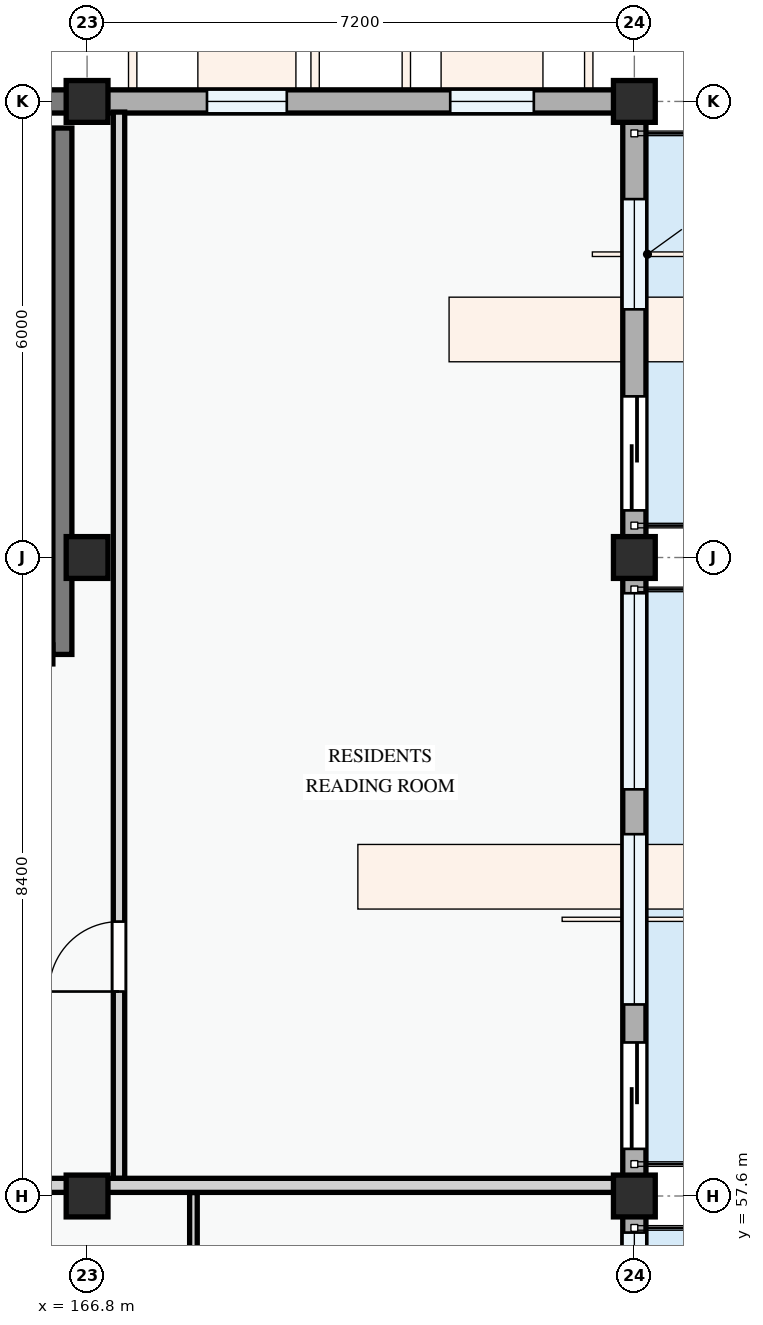
"""IFC4 building model, lengths in metres.
Left out: names, types, materials, properties, quantities, classifications, styles, units other than length and angle.
Written with IfcOpenShell. Run it as: python <this file> out.ifc"""

import sys

from ifc_helpers import new_model, si_unit, direction, frame, frame_2d, origin, origin_2d, place, context, subcontext, project, spatial, rectangle, extrude, element, fill, save


model = new_model("IFC4")
c1 = context("Model", 3, precision=1e-05, world=origin(), true_north=direction((0.0, 1.0)))
c2 = subcontext(c1, "Body", "Model", "MODEL_VIEW")
j1 = project(units=[si_unit("LENGTHUNIT", "METRE"), si_unit("PLANEANGLEUNIT", "RADIAN")], contexts=[c1])
p1 = place(None, origin())
s1 = spatial("IfcSite", under=j1, at=p1, CompositionType="ELEMENT")
p2 = place(p1, origin())
s2 = spatial("IfcBuilding", under=s1, at=p2, CompositionType="ELEMENT")
p3 = place(p2, frame((0.0, 0.0, 14.7)))
s3 = spatial("IfcBuildingStorey", under=s2, at=p3, CompositionType="ELEMENT", Elevation=14.7)
for number, where, z_axis, x_axis in (
    (1, (166.8, 57.6, 0.0), (0.0, 0.0, 1.0), (1.0, 0.0, 0.0)),
    (2, (166.8, 66.0, 0.0), (0.0, 0.0, 1.0), (1.0, 0.0, 0.0)),
    (3, (166.8, 72.0, 0.0), (0.0, 0.0, 1.0), (1.0, 0.0, 0.0)),
    (4, (174.0, 57.6, 0.0), (0.0, 0.0, 1.0), (1.0, 0.0, 0.0)),
    (5, (174.0, 66.0, 0.0), (0.0, 0.0, 1.0), (1.0, 0.0, 0.0)),
    (6, (174.0, 72.0, 0.0), (0.0, 0.0, 1.0), (1.0, 0.0, 0.0)),
):
    element("IfcColumn", number, at=place(p3, frame(where, z_axis=z_axis, x_axis=x_axis)), inside=s3, PredefinedType="COLUMN", context=c2, shape_type="SweptSolid", body=[
        extrude(rectangle(XDim=0.55, YDim=0.55, at=origin_2d()), origin(), (0.0, 0.0, 1.0), 3.3),
    ])
p4 = place(p3, frame((174.0, 51.6, 0.0), z_axis=(0.0, 0.0, 1.0), x_axis=(0.0, 1.0, 0.0)))
e7 = element("IfcWall", 7, at=p4, inside=s3, PredefinedType="STANDARD", context=c2, shape_type="SweptSolid", body=[
    extrude(rectangle(XDim=6.0, YDim=0.305, at=frame_2d((3.0, 0.0))), origin(), (0.0, 0.0, 1.0), 2.575),
])
p5 = place(p4, frame((2.378, 0.0, 0.0)))
e8 = element("IfcOpeningElement", 8, at=p5, cuts=e7, PredefinedType="OPENING", context=c2, shape_type="SweptSolid", body=[
    extrude(rectangle(XDim=1.3, YDim=2.15, at=frame_2d((0.65, 1.075))), frame((0.0, 0.163, 0.0), z_axis=(0.0, -1.0, 0.0), x_axis=(1.0, 0.0, 0.0)), (0.0, 0.0, 1.0), 0.325),
])
p6 = place(p4, frame((0.669, 0.0, 0.78)))
e9 = element("IfcOpeningElement", 9, at=p6, cuts=e7, PredefinedType="OPENING", context=c2, shape_type="SweptSolid", body=[
    extrude(rectangle(XDim=0.9, YDim=1.2, at=frame_2d((0.45, 0.6))), frame((0.0, 0.163, 0.0), z_axis=(0.0, -1.0, 0.0), x_axis=(1.0, 0.0, 0.0)), (0.0, 0.0, 1.0), 0.325),
])
p7 = place(p4, frame((4.019, 0.0, 0.78)))
e10 = element("IfcOpeningElement", 10, at=p7, cuts=e7, PredefinedType="OPENING", context=c2, shape_type="SweptSolid", body=[
    extrude(rectangle(XDim=1.5, YDim=1.5, at=frame_2d((0.75, 0.75))), frame((0.0, 0.163, 0.0), z_axis=(0.0, -1.0, 0.0), x_axis=(1.0, 0.0, 0.0)), (0.0, 0.0, 1.0), 0.325),
])
p8 = place(p3, frame((174.0, 57.6, 0.0), z_axis=(0.0, 0.0, 1.0), x_axis=(0.0, 1.0, 0.0)))
e11 = element("IfcWall", 11, at=p8, inside=s3, PredefinedType="STANDARD", context=c2, shape_type="SweptSolid", body=[
    extrude(rectangle(XDim=8.4, YDim=0.305, at=frame_2d((4.2, 0.0))), origin(), (0.0, 0.0, 1.0), 2.425),
])
p9 = place(p8, frame((0.62, 0.0, 0.0)))
e12 = element("IfcOpeningElement", 12, at=p9, cuts=e11, PredefinedType="OPENING", context=c2, shape_type="SweptSolid", body=[
    extrude(rectangle(XDim=1.4, YDim=2.2, at=frame_2d((0.7, 1.1))), frame((0.0, 0.163, 0.0), z_axis=(0.0, -1.0, 0.0), x_axis=(1.0, 0.0, 0.0)), (0.0, 0.0, 1.0), 0.325),
])
p10 = place(p8, frame((2.52, 0.0, 0.78)))
e13 = element("IfcOpeningElement", 13, at=p10, cuts=e11, PredefinedType="OPENING", context=c2, shape_type="SweptSolid", body=[
    extrude(rectangle(XDim=2.24, YDim=1.52, at=frame_2d((1.12, 0.76))), frame((0.0, 0.163, 0.0), z_axis=(0.0, -1.0, 0.0), x_axis=(1.0, 0.0, 0.0)), (0.0, 0.0, 1.0), 0.325),
])
p11 = place(p8, frame((5.35, 0.0, 0.78)))
e14 = element("IfcOpeningElement", 14, at=p11, cuts=e11, PredefinedType="OPENING", context=c2, shape_type="SweptSolid", body=[
    extrude(rectangle(XDim=2.58, YDim=1.48, at=frame_2d((1.29, 0.74))), frame((0.0, 0.163, 0.0), z_axis=(0.0, -1.0, 0.0), x_axis=(1.0, 0.0, 0.0)), (0.0, 0.0, 1.0), 0.325),
])
p12 = place(p3, frame((174.0, 66.0, 0.0), z_axis=(0.0, 0.0, 1.0), x_axis=(0.0, 1.0, 0.0)))
e15 = element("IfcWall", 15, at=p12, inside=s3, PredefinedType="STANDARD", context=c2, shape_type="SweptSolid", body=[
    extrude(rectangle(XDim=6.0, YDim=0.305, at=frame_2d((3.0, 0.0))), origin(), (0.0, 0.0, 1.0), 2.575),
])
p13 = place(p12, frame((0.62, 0.0, 0.0)))
e16 = element("IfcOpeningElement", 16, at=p13, cuts=e15, PredefinedType="OPENING", context=c2, shape_type="SweptSolid", body=[
    extrude(rectangle(XDim=1.5, YDim=2.2, at=frame_2d((0.75, 1.1))), frame((0.0, 0.163, 0.0), z_axis=(0.0, -1.0, 0.0), x_axis=(1.0, 0.0, 0.0)), (0.0, 0.0, 1.0), 0.325),
])
p14 = place(p12, frame((3.265, 0.0, 0.78)))
e17 = element("IfcOpeningElement", 17, at=p14, cuts=e15, PredefinedType="OPENING", context=c2, shape_type="SweptSolid", body=[
    extrude(rectangle(XDim=1.45, YDim=1.6, at=frame_2d((0.725, 0.8))), frame((0.0, 0.163, 0.0), z_axis=(0.0, -1.0, 0.0), x_axis=(1.0, 0.0, 0.0)), (0.0, 0.0, 1.0), 0.325),
])
p15 = place(p3, frame((174.0, 72.0, 0.0), z_axis=(0.0, 0.0, 1.0), x_axis=(-1.0, 0.0, 0.0)))
e18 = element("IfcWall", 18, at=p15, inside=s3, PredefinedType="STANDARD", context=c2, shape_type="SweptSolid", body=[
    extrude(rectangle(XDim=7.2, YDim=0.305, at=frame_2d((3.6, 0.0))), origin(), (0.0, 0.0, 1.0), 2.375),
])
p16 = place(p15, frame((1.323, 0.0, 0.78)))
e19 = element("IfcOpeningElement", 19, at=p16, cuts=e18, PredefinedType="OPENING", context=c2, shape_type="SweptSolid", body=[
    extrude(rectangle(XDim=1.1, YDim=1.3, at=frame_2d((0.55, 0.65))), frame((0.0, 0.163, 0.0), z_axis=(0.0, -1.0, 0.0), x_axis=(1.0, 0.0, 0.0)), (0.0, 0.0, 1.0), 0.325),
])
p17 = place(p15, frame((4.573, 0.0, 0.78)))
e20 = element("IfcOpeningElement", 20, at=p17, cuts=e18, PredefinedType="OPENING", context=c2, shape_type="SweptSolid", body=[
    extrude(rectangle(XDim=1.05, YDim=1.2, at=frame_2d((0.525, 0.6))), frame((0.0, 0.163, 0.0), z_axis=(0.0, -1.0, 0.0), x_axis=(1.0, 0.0, 0.0)), (0.0, 0.0, 1.0), 0.325),
])
p18 = place(p3, frame((166.8, 72.0, 0.0), z_axis=(0.0, 0.0, 1.0), x_axis=(-1.0, 0.0, 0.0)))
e21 = element("IfcWall", 21, at=p18, inside=s3, PredefinedType="STANDARD", context=c2, shape_type="SweptSolid", body=[
    extrude(rectangle(XDim=0.65, YDim=0.305, at=frame_2d((0.325, 0.0))), origin(), (0.0, 0.0, 1.0), 3.04),
])
p19 = place(p3, frame((166.475, 71.65, 0.0), z_axis=(0.0, 0.0, 1.0), x_axis=(0.0, -1.0, 0.0)))
e22 = element("IfcWall", 22, at=p19, inside=s3, PredefinedType="SHEAR", context=c2, shape_type="SweptSolid", body=[
    extrude(rectangle(XDim=6.925, YDim=0.25, at=frame_2d((3.462, 0.0))), origin(), (0.0, 0.0, 1.0), 3.0),
])
p20 = place(p3, frame((168.199, 53.707, 0.0), z_axis=(0.0, 0.0, 1.0), x_axis=(0.0, 1.0, 0.0)))
e23 = element("IfcWall", 23, at=p20, inside=s3, PredefinedType="PARTITIONING", context=c2, shape_type="SweptSolid", body=[
    extrude(rectangle(XDim=3.938, YDim=0.1, at=frame_2d((1.969, 0.0))), origin(), (0.0, 0.0, 1.0), 3.0),
])
p21 = place(p3, frame((162.064, 57.74, 0.0), z_axis=(0.0, 0.0, 1.0), x_axis=(1.0, 0.0, 0.0)))
e24 = element("IfcWall", 24, at=p21, inside=s3, PredefinedType="PARTITIONING", context=c2, shape_type="SweptSolid", body=[
    extrude(rectangle(XDim=11.781, YDim=0.185, at=frame_2d((5.891, 0.0))), origin(), (0.0, 0.0, 1.0), 2.375),
])
p22 = place(p3, frame((167.22, 57.834, 0.0), z_axis=(0.0, 0.0, 1.0), x_axis=(0.0, 1.0, 0.0)))
e25 = element("IfcWall", 25, at=p22, inside=s3, PredefinedType="PARTITIONING", context=c2, shape_type="SweptSolid", body=[
    extrude(rectangle(XDim=14.026, YDim=0.15, at=frame_2d((7.013, 0.0))), origin(), (0.0, 0.0, 1.0), 2.425),
])
p23 = place(p22, frame((2.456, 0.0, 0.0)))
e26 = element("IfcOpeningElement", 26, at=p23, cuts=e25, PredefinedType="OPENING", context=c2, shape_type="SweptSolid", body=[
    extrude(rectangle(XDim=0.92, YDim=2.1, at=frame_2d((0.46, 1.05))), frame((0.0, 0.085, 0.0), z_axis=(0.0, -1.0, 0.0), x_axis=(1.0, 0.0, 0.0)), (0.0, 0.0, 1.0), 0.17),
])
p24 = place(p7, origin())
e27 = element("IfcWindow", 27, at=p24, inside=s3, PartitioningType="SINGLE_PANEL", PredefinedType="WINDOW", context=c2, shape_type="SweptSolid", body=[
    extrude(rectangle(XDim=1.5, YDim=1.5, at=frame_2d((0.75, 0.75))), frame((0.0, 0.03, 0.0), z_axis=(0.0, -1.0, 0.0), x_axis=(1.0, 0.0, 0.0)), (0.0, 0.0, 1.0), 0.06),
])
fill(e10, e27)
p25 = place(p9, frame((1.4, 0.0, 0.0), z_axis=(0.0, 0.0, 1.0), x_axis=(-1.0, 0.0, 0.0)))
e28 = element("IfcDoor", 28, at=p25, inside=s3, OperationType="SLIDING_TO_LEFT", PredefinedType="DOOR", context=c2, shape_type="SweptSolid", body=[
    extrude(rectangle(XDim=1.4, YDim=2.2, at=frame_2d((0.7, 1.1))), frame((0.0, 0.025, 0.0), z_axis=(0.0, -1.0, 0.0), x_axis=(1.0, 0.0, 0.0)), (0.0, 0.0, 1.0), 0.05),
])
fill(e12, e28)
p26 = place(p10, origin())
e29 = element("IfcWindow", 29, at=p26, inside=s3, PartitioningType="DOUBLE_PANEL_VERTICAL", PredefinedType="WINDOW", context=c2, shape_type="SweptSolid", body=[
    extrude(rectangle(XDim=2.24, YDim=1.52, at=frame_2d((1.12, 0.76))), frame((0.0, 0.03, 0.0), z_axis=(0.0, -1.0, 0.0), x_axis=(1.0, 0.0, 0.0)), (0.0, 0.0, 1.0), 0.06),
])
fill(e13, e29)
p27 = place(p11, origin())
e30 = element("IfcWindow", 30, at=p27, inside=s3, PartitioningType="DOUBLE_PANEL_VERTICAL", PredefinedType="WINDOW", context=c2, shape_type="SweptSolid", body=[
    extrude(rectangle(XDim=2.58, YDim=1.48, at=frame_2d((1.29, 0.74))), frame((0.0, 0.03, 0.0), z_axis=(0.0, -1.0, 0.0), x_axis=(1.0, 0.0, 0.0)), (0.0, 0.0, 1.0), 0.06),
])
fill(e14, e30)
p28 = place(p13, frame((1.5, 0.0, 0.0), z_axis=(0.0, 0.0, 1.0), x_axis=(-1.0, 0.0, 0.0)))
e31 = element("IfcDoor", 31, at=p28, inside=s3, OperationType="SLIDING_TO_RIGHT", PredefinedType="DOOR", context=c2, shape_type="SweptSolid", body=[
    extrude(rectangle(XDim=1.5, YDim=2.2, at=frame_2d((0.75, 1.1))), frame((0.0, 0.025, 0.0), z_axis=(0.0, -1.0, 0.0), x_axis=(1.0, 0.0, 0.0)), (0.0, 0.0, 1.0), 0.05),
])
fill(e16, e31)
p29 = place(p14, origin())
e32 = element("IfcWindow", 32, at=p29, inside=s3, PartitioningType="SINGLE_PANEL", PredefinedType="WINDOW", context=c2, shape_type="SweptSolid", body=[
    extrude(rectangle(XDim=1.45, YDim=1.6, at=frame_2d((0.725, 0.8))), frame((0.0, 0.03, 0.0), z_axis=(0.0, -1.0, 0.0), x_axis=(1.0, 0.0, 0.0)), (0.0, 0.0, 1.0), 0.06),
])
fill(e17, e32)
p30 = place(p16, origin())
e33 = element("IfcWindow", 33, at=p30, inside=s3, PartitioningType="SINGLE_PANEL", PredefinedType="WINDOW", context=c2, shape_type="SweptSolid", body=[
    extrude(rectangle(XDim=1.1, YDim=1.3, at=frame_2d((0.55, 0.65))), frame((0.0, 0.03, 0.0), z_axis=(0.0, -1.0, 0.0), x_axis=(1.0, 0.0, 0.0)), (0.0, 0.0, 1.0), 0.06),
])
fill(e19, e33)
p31 = place(p17, origin())
e34 = element("IfcWindow", 34, at=p31, inside=s3, PartitioningType="SINGLE_PANEL", PredefinedType="WINDOW", context=c2, shape_type="SweptSolid", body=[
    extrude(rectangle(XDim=1.05, YDim=1.2, at=frame_2d((0.525, 0.6))), frame((0.0, 0.03, 0.0), z_axis=(0.0, -1.0, 0.0), x_axis=(1.0, 0.0, 0.0)), (0.0, 0.0, 1.0), 0.06),
])
fill(e20, e34)
p32 = place(p23, origin())
e35 = element("IfcDoor", 35, at=p32, inside=s3, OperationType="SINGLE_SWING_LEFT", PredefinedType="DOOR", context=c2, shape_type="SweptSolid", body=[
    extrude(rectangle(XDim=0.92, YDim=2.1, at=frame_2d((0.46, 1.05))), frame((0.0, 0.025, 0.0), z_axis=(0.0, -1.0, 0.0), x_axis=(1.0, 0.0, 0.0)), (0.0, 0.0, 1.0), 0.05),
])
fill(e26, e35)
save(model, sys.argv[1])
